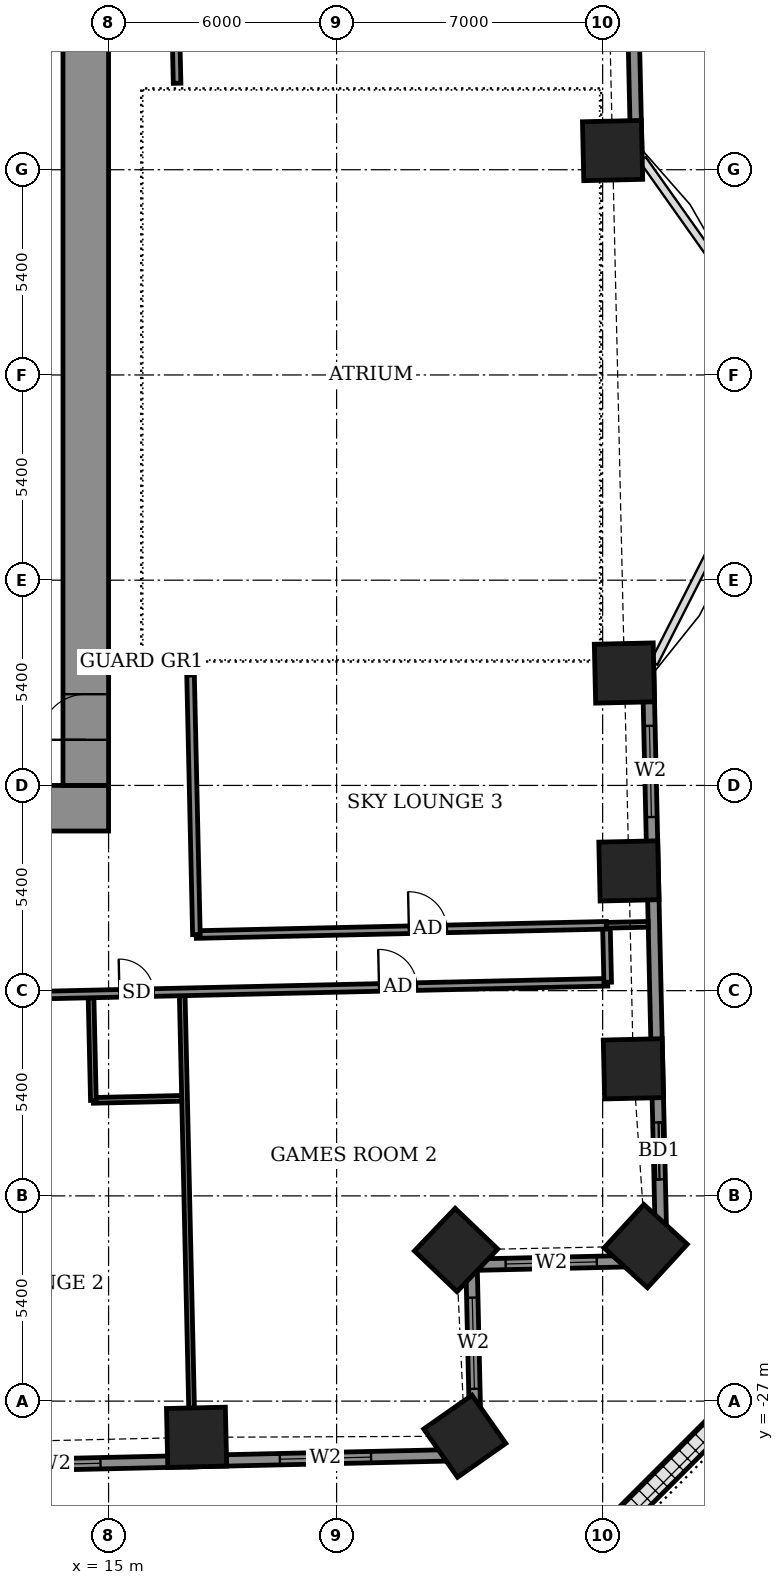
"""IFC4 building model, lengths in metres.
Left out: names, types, materials, properties, quantities, classifications, styles, units other than length and angle.
Written with IfcOpenShell. Run it as: python <this file> out.ifc"""

import sys

from ifc_helpers import new_model, si_unit, direction, frame, frame_2d, origin, origin_2d, place, context, subcontext, project, spatial, rectangle, extrude, element, fill, save


model = new_model("IFC4")
c1 = context("Model", 3, precision=1e-05, world=origin(), true_north=direction((0.0, 1.0)))
c2 = subcontext(c1, "Body", "Model", "MODEL_VIEW")
j1 = project(units=[si_unit("LENGTHUNIT", "METRE"), si_unit("PLANEANGLEUNIT", "RADIAN")], contexts=[c1])
p1 = place(None, origin())
s1 = spatial("IfcSite", under=j1, at=p1, CompositionType="ELEMENT")
p2 = place(p1, origin())
s2 = spatial("IfcBuilding", under=s1, at=p2, CompositionType="ELEMENT")
p3 = place(p2, frame((0.0, 0.0, 29.5)))
s3 = spatial("IfcBuildingStorey", under=s2, at=p3, CompositionType="ELEMENT", Elevation=29.5)
for number, where, z_axis, x_axis in (
    (1, (17.315, -27.952, -0.55), (0.0, 0.0, 1.0), (1.0, 0.023, 0.0)),
    (2, (24.372, -27.923, -0.55), (0.0, 0.0, 1.0), (0.819, 0.574, 0.0)),
    (3, (24.144, -23.024, -0.55), (0.0, 0.0, 1.0), (0.691, 0.723, 0.0)),
    (4, (29.132, -22.921, -0.55), (0.0, 0.0, 1.0), (0.676, 0.737, 0.0)),
    (5, (28.809, -18.257, -0.55), (0.0, 0.0, 1.0), (-0.023, 1.0, 0.0)),
    (6, (28.691, -13.05, -0.55), (0.0, 0.0, 1.0), (-0.023, 1.0, 0.0)),
    (7, (28.573, -7.843, -0.55), (0.0, 0.0, 1.0), (-0.023, 1.0, 0.0)),
    (8, (28.261, 5.904, -0.55), (0.0, 0.0, 1.0), (-0.023, 1.0, 0.0)),
):
    element("IfcColumn", number, at=place(p3, frame(where, z_axis=z_axis, x_axis=x_axis)), inside=s3, PredefinedType="COLUMN", context=c2, shape_type="SweptSolid", body=[
        extrude(rectangle(XDim=1.55, YDim=1.55, at=origin_2d()), origin(), (0.0, 0.0, 1.0), 4.6),
    ])
p4 = place(p3, frame((29.549, -23.299, 0.0), z_axis=(0.0, 0.0, 1.0), x_axis=(-0.022670336976, 0.999742994885, 0.0)))
e9 = element("IfcWall", 9, at=p4, inside=s3, PredefinedType="SOLIDWALL", context=c2, shape_type="SweptSolid", body=[
    extrude(rectangle(XDim=15.529, YDim=0.3, at=frame_2d((7.765, 0.0))), origin(), (0.0, 0.0, 1.0), 4.05),
])
p5 = place(p4, frame((2.133, 0.0, 0.0)))
e10 = element("IfcOpeningElement", 10, at=p5, cuts=e9, PredefinedType="OPENING", context=c2, shape_type="SweptSolid", body=[
    extrude(rectangle(XDim=1.5, YDim=2.4, at=frame_2d((0.75, 1.2))), frame((0.0, 0.16, 0.0), z_axis=(0.0, -1.0, 0.0), x_axis=(1.0, 0.0, 0.0)), (0.0, 0.0, 1.0), 0.32),
])
p6 = place(p4, frame((11.67, 0.0, 0.9)))
e11 = element("IfcOpeningElement", 11, at=p6, cuts=e9, PredefinedType="OPENING", context=c2, shape_type="SweptSolid", body=[
    extrude(rectangle(XDim=2.4, YDim=1.5, at=frame_2d((1.2, 0.75))), frame((0.0, 0.16, 0.0), z_axis=(0.0, -1.0, 0.0), x_axis=(1.0, 0.0, 0.0)), (0.0, 0.0, 1.0), 0.32),
])
p7 = place(p3, frame((28.887, 5.864, 0.0), z_axis=(0.0, 0.0, 1.0), x_axis=(-0.022687182773, 0.999742612745, 0.0)))
e12 = element("IfcWall", 12, at=p7, inside=s3, PredefinedType="SOLIDWALL", context=c2, shape_type="SweptSolid", body=[
    extrude(rectangle(XDim=16.529, YDim=0.3, at=frame_2d((8.265, 0.0))), origin(), (0.0, 0.0, 1.0), 4.05),
])
p8 = place(p7, frame((2.929, 0.0, 0.0)))
e13 = element("IfcOpeningElement", 13, at=p8, cuts=e12, PredefinedType="OPENING", context=c2, shape_type="SweptSolid", body=[
    extrude(rectangle(XDim=1.5, YDim=2.4, at=frame_2d((0.75, 1.2))), frame((0.0, 0.16, 0.0), z_axis=(0.0, -1.0, 0.0), x_axis=(1.0, 0.0, 0.0)), (0.0, 0.0, 1.0), 0.32),
])
p9 = place(p7, frame((7.629, 0.0, 0.9)))
e14 = element("IfcOpeningElement", 14, at=p9, cuts=e12, PredefinedType="OPENING", context=c2, shape_type="SweptSolid", body=[
    extrude(rectangle(XDim=0.9, YDim=1.5, at=frame_2d((0.45, 0.75))), frame((0.0, 0.16, 0.0), z_axis=(0.0, -1.0, 0.0), x_axis=(1.0, 0.0, 0.0)), (0.0, 0.0, 1.0), 0.32),
])
p10 = place(p7, frame((12.329, 0.0, 0.9)))
e15 = element("IfcOpeningElement", 15, at=p10, cuts=e12, PredefinedType="OPENING", context=c2, shape_type="SweptSolid", body=[
    extrude(rectangle(XDim=2.4, YDim=1.5, at=frame_2d((1.2, 0.75))), frame((0.0, 0.16, 0.0), z_axis=(0.0, -1.0, 0.0), x_axis=(1.0, 0.0, 0.0)), (0.0, 0.0, 1.0), 0.32),
])
p11 = place(p3, frame((-27.423, -29.593, 0.0), z_axis=(0.0, 0.0, 1.0), x_axis=(0.999742563204, 0.022689365739, 0.0)))
e16 = element("IfcWall", 16, at=p11, inside=s3, PredefinedType="SOLIDWALL", context=c2, shape_type="SweptSolid", body=[
    extrude(rectangle(XDim=52.101, YDim=0.3, at=frame_2d((26.05, 0.0))), origin(), (0.0, 0.0, 1.0), 4.05),
])
p12 = place(p11, frame((3.173, 0.0, 0.0)))
e17 = element("IfcOpeningElement", 17, at=p12, cuts=e16, PredefinedType="OPENING", context=c2, shape_type="SweptSolid", body=[
    extrude(rectangle(XDim=1.5, YDim=2.4, at=frame_2d((0.75, 1.2))), frame((0.0, 0.16, 0.0), z_axis=(0.0, -1.0, 0.0), x_axis=(1.0, 0.0, 0.0)), (0.0, 0.0, 1.0), 0.32),
])
p13 = place(p11, frame((10.123, 0.0, 0.9)))
e18 = element("IfcOpeningElement", 18, at=p13, cuts=e16, PredefinedType="OPENING", context=c2, shape_type="SweptSolid", body=[
    extrude(rectangle(XDim=2.4, YDim=1.5, at=frame_2d((1.2, 0.75))), frame((0.0, 0.16, 0.0), z_axis=(0.0, -1.0, 0.0), x_axis=(1.0, 0.0, 0.0)), (0.0, 0.0, 1.0), 0.32),
])
p14 = place(p11, frame((17.8, 0.0, 0.0)))
e19 = element("IfcOpeningElement", 19, at=p14, cuts=e16, PredefinedType="OPENING", context=c2, shape_type="SweptSolid", body=[
    extrude(rectangle(XDim=1.5, YDim=2.4, at=frame_2d((0.75, 1.2))), frame((0.0, 0.16, 0.0), z_axis=(0.0, -1.0, 0.0), x_axis=(1.0, 0.0, 0.0)), (0.0, 0.0, 1.0), 0.32),
])
p15 = place(p11, frame((23.691, 0.0, 0.0)))
e20 = element("IfcOpeningElement", 20, at=p15, cuts=e16, PredefinedType="OPENING", context=c2, shape_type="SweptSolid", body=[
    extrude(rectangle(XDim=1.5, YDim=2.4, at=frame_2d((0.75, 1.2))), frame((0.0, 0.16, 0.0), z_axis=(0.0, -1.0, 0.0), x_axis=(1.0, 0.0, 0.0)), (0.0, 0.0, 1.0), 0.32),
])
p16 = place(p11, frame((26.909, 0.0, 0.0)))
e21 = element("IfcOpeningElement", 21, at=p16, cuts=e16, PredefinedType="OPENING", context=c2, shape_type="SweptSolid", body=[
    extrude(rectangle(XDim=1.5, YDim=2.4, at=frame_2d((0.75, 1.2))), frame((0.0, 0.16, 0.0), z_axis=(0.0, -1.0, 0.0), x_axis=(1.0, 0.0, 0.0)), (0.0, 0.0, 1.0), 0.32),
])
p17 = place(p11, frame((32.825, 0.0, 0.0)))
e22 = element("IfcOpeningElement", 22, at=p17, cuts=e16, PredefinedType="OPENING", context=c2, shape_type="SweptSolid", body=[
    extrude(rectangle(XDim=1.5, YDim=2.4, at=frame_2d((0.75, 1.2))), frame((0.0, 0.16, 0.0), z_axis=(0.0, -1.0, 0.0), x_axis=(1.0, 0.0, 0.0)), (0.0, 0.0, 1.0), 0.32),
])
p18 = place(p11, frame((39.821, 0.0, 0.9)))
e23 = element("IfcOpeningElement", 23, at=p18, cuts=e16, PredefinedType="OPENING", context=c2, shape_type="SweptSolid", body=[
    extrude(rectangle(XDim=2.4, YDim=1.5, at=frame_2d((1.2, 0.75))), frame((0.0, 0.16, 0.0), z_axis=(0.0, -1.0, 0.0), x_axis=(1.0, 0.0, 0.0)), (0.0, 0.0, 1.0), 0.32),
])
p19 = place(p11, frame((46.942, 0.0, 0.9)))
e24 = element("IfcOpeningElement", 24, at=p19, cuts=e16, PredefinedType="OPENING", context=c2, shape_type="SweptSolid", body=[
    extrude(rectangle(XDim=2.4, YDim=1.5, at=frame_2d((1.2, 0.75))), frame((0.0, 0.16, 0.0), z_axis=(0.0, -1.0, 0.0), x_axis=(1.0, 0.0, 0.0)), (0.0, 0.0, 1.0), 0.32),
])
p20 = place(p3, frame((24.664, -28.411, 0.0), z_axis=(0.0, 0.0, 1.0), x_axis=(-0.022802372469, 0.999739992103, 0.0)))
e25 = element("IfcWall", 25, at=p20, inside=s3, PredefinedType="SOLIDWALL", context=c2, shape_type="SweptSolid", body=[
    extrude(rectangle(XDim=5.0, YDim=0.3, at=frame_2d((2.5, 0.0))), origin(), (0.0, 0.0, 1.0), 3.55),
])
p21 = place(p20, frame((1.735, 0.0, 0.9)))
e26 = element("IfcOpeningElement", 26, at=p21, cuts=e25, PredefinedType="OPENING", context=c2, shape_type="SweptSolid", body=[
    extrude(rectangle(XDim=2.4, YDim=1.5, at=frame_2d((1.2, 0.75))), frame((0.0, 0.16, 0.0), z_axis=(0.0, -1.0, 0.0), x_axis=(1.0, 0.0, 0.0)), (0.0, 0.0, 1.0), 0.32),
])
p22 = place(p3, frame((24.55, -23.412, 0.0), z_axis=(0.0, 0.0, 1.0), x_axis=(0.999744450377, 0.022606059803, 0.0)))
e27 = element("IfcWall", 27, at=p22, inside=s3, PredefinedType="SOLIDWALL", context=c2, shape_type="SweptSolid", body=[
    extrude(rectangle(XDim=5.0, YDim=0.3, at=frame_2d((2.5, 0.0))), origin(), (0.0, 0.0, 1.0), 4.05),
])
p23 = place(p22, frame((0.897, 0.0, 0.9)))
e28 = element("IfcOpeningElement", 28, at=p23, cuts=e27, PredefinedType="OPENING", context=c2, shape_type="SweptSolid", body=[
    extrude(rectangle(XDim=2.4, YDim=1.5, at=frame_2d((1.2, 0.75))), frame((0.0, 0.16, 0.0), z_axis=(0.0, -1.0, 0.0), x_axis=(1.0, 0.0, 0.0)), (0.0, 0.0, 1.0), 0.32),
])
p24 = place(p3, frame((30.945, -20.917, 0.0), z_axis=(0.0, 0.0, 1.0), x_axis=(-0.022665943652, 0.999743094499, 0.0)))
e29 = element("IfcWall", 29, at=p24, inside=s3, PredefinedType="USERDEFINED", context=c2, shape_type="SweptSolid", body=[
    extrude(rectangle(XDim=6.0, YDim=0.55, at=frame_2d((3.0, 0.0))), origin(), (0.0, 0.0, 1.0), 0.8),
])
p25 = place(p3, frame((14.049, -30.102, 0.0), z_axis=(0.0, 0.0, 1.0), x_axis=(0.999743178102, 0.022662255828, 0.0)))
e30 = element("IfcWall", 30, at=p25, inside=s3, PredefinedType="USERDEFINED", context=c2, shape_type="SweptSolid", body=[
    extrude(rectangle(XDim=6.0, YDim=0.55, at=frame_2d((3.0, 0.0))), origin(), (0.0, 0.0, 1.0), 0.8),
])
p26 = place(p3, frame((35.513, -23.1, 0.0), z_axis=(0.0, 0.0, 1.0), x_axis=(-0.707106781187, -0.707106781187, 0.0)))
e31 = element("IfcWall", 31, at=p26, inside=s3, PredefinedType="USERDEFINED", context=c2, shape_type="SweptSolid", body=[
    extrude(rectangle(XDim=10.201, YDim=0.55, at=frame_2d((5.1, 0.0))), origin(), (0.0, 0.0, 1.0), 0.8),
])
p27 = place(p3, frame((17.219, -28.73, 0.0), z_axis=(0.0, 0.0, 1.0), x_axis=(-0.022661475803, 0.999743195783, 0.0)))
e32 = element("IfcWall", 32, at=p27, inside=s3, PredefinedType="PARTITIONING", context=c2, shape_type="SweptSolid", body=[
    extrude(rectangle(XDim=12.4, YDim=0.15, at=frame_2d((6.2, 0.0))), origin(), (0.0, 0.0, 1.0), 4.05),
])
p28 = place(p3, frame((14.6, -19.087, 0.0), z_axis=(0.0, 0.0, 1.0), x_axis=(0.999740260747, 0.02279059109, 0.0)))
e33 = element("IfcWall", 33, at=p28, inside=s3, PredefinedType="PARTITIONING", context=c2, shape_type="SweptSolid", body=[
    extrude(rectangle(XDim=2.324, YDim=0.15, at=frame_2d((1.162, 0.0))), origin(), (0.0, 0.0, 1.0), 4.05),
])
p29 = place(p3, frame((14.6, -19.087, 0.0), z_axis=(0.0, 0.0, 1.0), x_axis=(-0.02260842146, 0.999744396973, 0.0)))
e34 = element("IfcWall", 34, at=p29, inside=s3, PredefinedType="PARTITIONING", context=c2, shape_type="SweptSolid", body=[
    extrude(rectangle(XDim=2.7, YDim=0.15, at=frame_2d((1.35, 0.0))), origin(), (0.0, 0.0, 1.0), 4.05),
])
p30 = place(p3, frame((-30.652, -17.313, 0.0), z_axis=(0.0, 0.0, 1.0), x_axis=(0.999742623764, 0.02268669719, 0.0)))
e35 = element("IfcWall", 35, at=p30, inside=s3, PredefinedType="PARTITIONING", context=c2, shape_type="SweptSolid", body=[
    extrude(rectangle(XDim=58.8, YDim=0.2, at=frame_2d((29.4, 0.0))), origin(), (0.0, 0.0, 1.0), 4.05),
])
p31 = place(p30, frame((3.175, 0.0, 0.0)))
e36 = element("IfcOpeningElement", 36, at=p31, cuts=e35, PredefinedType="OPENING", context=c2, shape_type="SweptSolid", body=[
    extrude(rectangle(XDim=1.0, YDim=2.1, at=frame_2d((0.5, 1.05))), frame((0.0, 0.11, 0.0), z_axis=(0.0, -1.0, 0.0), x_axis=(1.0, 0.0, 0.0)), (0.0, 0.0, 1.0), 0.22),
])
p32 = place(p30, frame((9.6, 0.0, 0.0)))
e37 = element("IfcOpeningElement", 37, at=p32, cuts=e35, PredefinedType="OPENING", context=c2, shape_type="SweptSolid", body=[
    extrude(rectangle(XDim=0.9, YDim=2.1, at=frame_2d((0.45, 1.05))), frame((0.0, 0.11, 0.0), z_axis=(0.0, -1.0, 0.0), x_axis=(1.0, 0.0, 0.0)), (0.0, 0.0, 1.0), 0.22),
])
p33 = place(p30, frame((14.675, 0.0, 0.0)))
e38 = element("IfcOpeningElement", 38, at=p33, cuts=e35, PredefinedType="OPENING", context=c2, shape_type="SweptSolid", body=[
    extrude(rectangle(XDim=1.0, YDim=2.1, at=frame_2d((0.5, 1.05))), frame((0.0, 0.11, 0.0), z_axis=(0.0, -1.0, 0.0), x_axis=(1.0, 0.0, 0.0)), (0.0, 0.0, 1.0), 0.22),
])
p34 = place(p30, frame((19.85, 0.0, 0.0)))
e39 = element("IfcOpeningElement", 39, at=p34, cuts=e35, PredefinedType="OPENING", context=c2, shape_type="SweptSolid", body=[
    extrude(rectangle(XDim=0.9, YDim=2.1, at=frame_2d((0.45, 1.05))), frame((0.0, 0.11, 0.0), z_axis=(0.0, -1.0, 0.0), x_axis=(1.0, 0.0, 0.0)), (0.0, 0.0, 1.0), 0.22),
])
p35 = place(p30, frame((27.25, 0.0, 0.0)))
e40 = element("IfcOpeningElement", 40, at=p35, cuts=e35, PredefinedType="OPENING", context=c2, shape_type="SweptSolid", body=[
    extrude(rectangle(XDim=0.9, YDim=2.1, at=frame_2d((0.45, 1.05))), frame((0.0, 0.11, 0.0), z_axis=(0.0, -1.0, 0.0), x_axis=(1.0, 0.0, 0.0)), (0.0, 0.0, 1.0), 0.22),
])
p36 = place(p30, frame((29.85, 0.0, 0.0)))
e41 = element("IfcOpeningElement", 41, at=p36, cuts=e35, PredefinedType="OPENING", context=c2, shape_type="SweptSolid", body=[
    extrude(rectangle(XDim=0.9, YDim=2.1, at=frame_2d((0.45, 1.05))), frame((0.0, 0.11, 0.0), z_axis=(0.0, -1.0, 0.0), x_axis=(1.0, 0.0, 0.0)), (0.0, 0.0, 1.0), 0.22),
])
p37 = place(p30, frame((37.275, 0.0, 0.0)))
e42 = element("IfcOpeningElement", 42, at=p37, cuts=e35, PredefinedType="OPENING", context=c2, shape_type="SweptSolid", body=[
    extrude(rectangle(XDim=0.9, YDim=2.1, at=frame_2d((0.45, 1.05))), frame((0.0, 0.11, 0.0), z_axis=(0.0, -1.0, 0.0), x_axis=(1.0, 0.0, 0.0)), (0.0, 0.0, 1.0), 0.22),
])
p38 = place(p30, frame((41.625, 0.0, 0.0)))
e43 = element("IfcOpeningElement", 43, at=p38, cuts=e35, PredefinedType="OPENING", context=c2, shape_type="SweptSolid", body=[
    extrude(rectangle(XDim=1.0, YDim=2.1, at=frame_2d((0.5, 1.05))), frame((0.0, 0.11, 0.0), z_axis=(0.0, -1.0, 0.0), x_axis=(1.0, 0.0, 0.0)), (0.0, 0.0, 1.0), 0.22),
])
p39 = place(p30, frame((45.95, 0.0, 0.0)))
e44 = element("IfcOpeningElement", 44, at=p39, cuts=e35, PredefinedType="OPENING", context=c2, shape_type="SweptSolid", body=[
    extrude(rectangle(XDim=0.9, YDim=2.1, at=frame_2d((0.45, 1.05))), frame((0.0, 0.11, 0.0), z_axis=(0.0, -1.0, 0.0), x_axis=(1.0, 0.0, 0.0)), (0.0, 0.0, 1.0), 0.22),
])
p40 = place(p30, frame((52.782, 0.0, 0.0)))
e45 = element("IfcOpeningElement", 45, at=p40, cuts=e35, PredefinedType="OPENING", context=c2, shape_type="SweptSolid", body=[
    extrude(rectangle(XDim=1.0, YDim=2.1, at=frame_2d((0.5, 1.05))), frame((0.0, 0.11, 0.0), z_axis=(0.0, -1.0, 0.0), x_axis=(1.0, 0.0, 0.0)), (0.0, 0.0, 1.0), 0.22),
])
p41 = place(p3, frame((28.133, -15.979, 0.0), z_axis=(0.0, 0.0, 1.0), x_axis=(-0.022632637625, 0.99974384905, 0.0)))
e46 = element("IfcWall", 46, at=p41, inside=s3, PredefinedType="PARTITIONING", context=c2, shape_type="SweptSolid", body=[
    extrude(rectangle(XDim=1.5, YDim=0.2, at=frame_2d((0.75, 0.0))), origin(), (0.0, 0.0, 1.0), 4.05),
])
p42 = place(p3, frame((17.306, -14.724, 0.0), z_axis=(0.0, 0.0, 1.0), x_axis=(0.999744269809, 0.022614043969, 0.0)))
e47 = element("IfcWall", 47, at=p42, inside=s3, PredefinedType="PARTITIONING", context=c2, shape_type="SweptSolid", body=[
    extrude(rectangle(XDim=10.796, YDim=0.2, at=frame_2d((5.398, 0.0))), origin(), (0.0, 0.0, 1.0), 4.05),
])
p43 = place(p42, frame((5.598, 0.0, 0.0)))
e48 = element("IfcOpeningElement", 48, at=p43, cuts=e47, PredefinedType="OPENING", context=c2, shape_type="SweptSolid", body=[
    extrude(rectangle(XDim=1.0, YDim=2.1, at=frame_2d((0.5, 1.05))), frame((0.0, 0.11, 0.0), z_axis=(0.0, -1.0, 0.0), x_axis=(1.0, 0.0, 0.0)), (0.0, 0.0, 1.0), 0.22),
])
p44 = place(p3, frame((17.311, -14.724, 0.0), z_axis=(0.0, 0.0, 1.0), x_axis=(-0.022562209343, 0.999745440955, 0.0)))
e49 = element("IfcWall", 49, at=p44, inside=s3, PredefinedType="PARTITIONING", context=c2, shape_type="SweptSolid", body=[
    extrude(rectangle(XDim=6.828, YDim=0.2, at=frame_2d((3.414, 0.0))), origin(), (0.0, 0.0, 1.0), 4.05),
])
p45 = place(p3, frame((28.095, -14.48, 0.0), z_axis=(0.0, 0.0, 1.0), x_axis=(0.999745251335, 0.022570609924, 0.0)))
e50 = element("IfcWall", 50, at=p45, inside=s3, PredefinedType="PARTITIONING", context=c2, shape_type="SweptSolid", body=[
    extrude(rectangle(XDim=1.103, YDim=0.15, at=frame_2d((0.552, 0.0))), origin(), (0.0, 0.0, 1.0), 3.55),
])
p46 = place(p3, frame((16.803, 7.675, 0.0), z_axis=(0.0, 0.0, 1.0), x_axis=(-0.022667483124, 0.999743059595, 0.0)))
e51 = element("IfcWall", 51, at=p46, inside=s3, PredefinedType="PARTITIONING", context=c2, shape_type="SweptSolid", body=[
    extrude(rectangle(XDim=5.245, YDim=0.2, at=frame_2d((2.623, 0.0))), origin(), (0.0, 0.0, 1.0), 4.05),
])
p47 = place(p46, frame((1.075, 0.0, 0.0)))
e52 = element("IfcOpeningElement", 52, at=p47, cuts=e51, PredefinedType="OPENING", context=c2, shape_type="SweptSolid", body=[
    extrude(rectangle(XDim=0.9, YDim=2.1, at=frame_2d((0.45, 1.05))), frame((0.0, 0.11, 0.0), z_axis=(0.0, -1.0, 0.0), x_axis=(1.0, 0.0, 0.0)), (0.0, 0.0, 1.0), 0.22),
])
p48 = place(p3, frame((-15.0, -11.4, 0.0), z_axis=(0.0, 0.0, 1.0), x_axis=(1.0, 0.0, 0.0)))
e53 = element("IfcWall", 53, at=p48, inside=s3, PredefinedType="SHEAR", context=c2, shape_type="SweptSolid", body=[
    extrude(rectangle(XDim=30.0, YDim=1.2, at=frame_2d((15.0, 0.0))), origin(), (0.0, 0.0, 1.0), 4.6),
])
p49 = place(p3, frame((14.4, -10.8, 0.0), z_axis=(0.0, 0.0, 1.0), x_axis=(0.0, 1.0, 0.0)))
e54 = element("IfcWall", 54, at=p49, inside=s3, PredefinedType="SHEAR", context=c2, shape_type="SweptSolid", body=[
    extrude(rectangle(XDim=21.6, YDim=1.2, at=frame_2d((10.8, 0.0))), origin(), (0.0, 0.0, 1.0), 4.6),
])
p50 = place(p49, frame((1.2, 0.0, 0.0)))
e55 = element("IfcOpeningElement", 55, at=p50, cuts=e54, PredefinedType="OPENING", context=c2, shape_type="SweptSolid", body=[
    extrude(rectangle(XDim=1.2, YDim=2.1, at=frame_2d((0.6, 1.05))), frame((0.0, 0.61, 0.0), z_axis=(0.0, -1.0, 0.0), x_axis=(1.0, 0.0, 0.0)), (0.0, 0.0, 1.0), 1.22),
])
p51 = place(p5, origin())
e56 = element("IfcDoor", 56, at=p51, inside=s3, OperationType="SLIDING_TO_LEFT", PredefinedType="DOOR", context=c2, shape_type="SweptSolid", body=[
    extrude(rectangle(XDim=1.5, YDim=2.4, at=frame_2d((0.75, 1.2))), frame((0.0, 0.025, 0.0), z_axis=(0.0, -1.0, 0.0), x_axis=(1.0, 0.0, 0.0)), (0.0, 0.0, 1.0), 0.05),
])
fill(e10, e56)
p52 = place(p6, origin())
e57 = element("IfcWindow", 57, at=p52, inside=s3, PartitioningType="DOUBLE_PANEL_VERTICAL", PredefinedType="WINDOW", context=c2, shape_type="SweptSolid", body=[
    extrude(rectangle(XDim=2.4, YDim=1.5, at=frame_2d((1.2, 0.75))), frame((0.0, 0.03, 0.0), z_axis=(0.0, -1.0, 0.0), x_axis=(1.0, 0.0, 0.0)), (0.0, 0.0, 1.0), 0.06),
])
fill(e11, e57)
p53 = place(p18, origin())
e58 = element("IfcWindow", 58, at=p53, inside=s3, PartitioningType="DOUBLE_PANEL_VERTICAL", PredefinedType="WINDOW", context=c2, shape_type="SweptSolid", body=[
    extrude(rectangle(XDim=2.4, YDim=1.5, at=frame_2d((1.2, 0.75))), frame((0.0, 0.03, 0.0), z_axis=(0.0, -1.0, 0.0), x_axis=(1.0, 0.0, 0.0)), (0.0, 0.0, 1.0), 0.06),
])
fill(e23, e58)
p54 = place(p19, origin())
e59 = element("IfcWindow", 59, at=p54, inside=s3, PartitioningType="DOUBLE_PANEL_VERTICAL", PredefinedType="WINDOW", context=c2, shape_type="SweptSolid", body=[
    extrude(rectangle(XDim=2.4, YDim=1.5, at=frame_2d((1.2, 0.75))), frame((0.0, 0.03, 0.0), z_axis=(0.0, -1.0, 0.0), x_axis=(1.0, 0.0, 0.0)), (0.0, 0.0, 1.0), 0.06),
])
fill(e24, e59)
p55 = place(p21, origin())
e60 = element("IfcWindow", 60, at=p55, inside=s3, PartitioningType="DOUBLE_PANEL_VERTICAL", PredefinedType="WINDOW", context=c2, shape_type="SweptSolid", body=[
    extrude(rectangle(XDim=2.4, YDim=1.5, at=frame_2d((1.2, 0.75))), frame((0.0, 0.03, 0.0), z_axis=(0.0, -1.0, 0.0), x_axis=(1.0, 0.0, 0.0)), (0.0, 0.0, 1.0), 0.06),
])
fill(e26, e60)
p56 = place(p23, origin())
e61 = element("IfcWindow", 61, at=p56, inside=s3, PartitioningType="DOUBLE_PANEL_VERTICAL", PredefinedType="WINDOW", context=c2, shape_type="SweptSolid", body=[
    extrude(rectangle(XDim=2.4, YDim=1.5, at=frame_2d((1.2, 0.75))), frame((0.0, 0.03, 0.0), z_axis=(0.0, -1.0, 0.0), x_axis=(1.0, 0.0, 0.0)), (0.0, 0.0, 1.0), 0.06),
])
fill(e28, e61)
p57 = place(p39, origin())
e62 = element("IfcDoor", 62, at=p57, inside=s3, OperationType="SINGLE_SWING_RIGHT", PredefinedType="DOOR", context=c2, shape_type="SweptSolid", body=[
    extrude(rectangle(XDim=0.9, YDim=2.1, at=frame_2d((0.45, 1.05))), frame((0.0, 0.025, 0.0), z_axis=(0.0, -1.0, 0.0), x_axis=(1.0, 0.0, 0.0)), (0.0, 0.0, 1.0), 0.05),
])
fill(e44, e62)
p58 = place(p40, origin())
e63 = element("IfcDoor", 63, at=p58, inside=s3, OperationType="SINGLE_SWING_RIGHT", PredefinedType="DOOR", context=c2, shape_type="SweptSolid", body=[
    extrude(rectangle(XDim=1.0, YDim=2.1, at=frame_2d((0.5, 1.05))), frame((0.0, 0.025, 0.0), z_axis=(0.0, -1.0, 0.0), x_axis=(1.0, 0.0, 0.0)), (0.0, 0.0, 1.0), 0.05),
])
fill(e45, e63)
p59 = place(p43, origin())
e64 = element("IfcDoor", 64, at=p59, inside=s3, OperationType="SINGLE_SWING_LEFT", PredefinedType="DOOR", context=c2, shape_type="SweptSolid", body=[
    extrude(rectangle(XDim=1.0, YDim=2.1, at=frame_2d((0.5, 1.05))), frame((0.0, 0.025, 0.0), z_axis=(0.0, -1.0, 0.0), x_axis=(1.0, 0.0, 0.0)), (0.0, 0.0, 1.0), 0.05),
])
fill(e48, e64)
p60 = place(p50, origin())
e65 = element("IfcDoor", 65, at=p60, inside=s3, OperationType="DOUBLE_DOOR_SINGLE_SWING", PredefinedType="DOOR", context=c2, shape_type="SweptSolid", body=[
    extrude(rectangle(XDim=1.2, YDim=2.1, at=frame_2d((0.6, 1.05))), frame((0.0, 0.025, 0.0), z_axis=(0.0, -1.0, 0.0), x_axis=(1.0, 0.0, 0.0)), (0.0, 0.0, 1.0), 0.05),
])
fill(e55, e65)
save(model, sys.argv[1])
